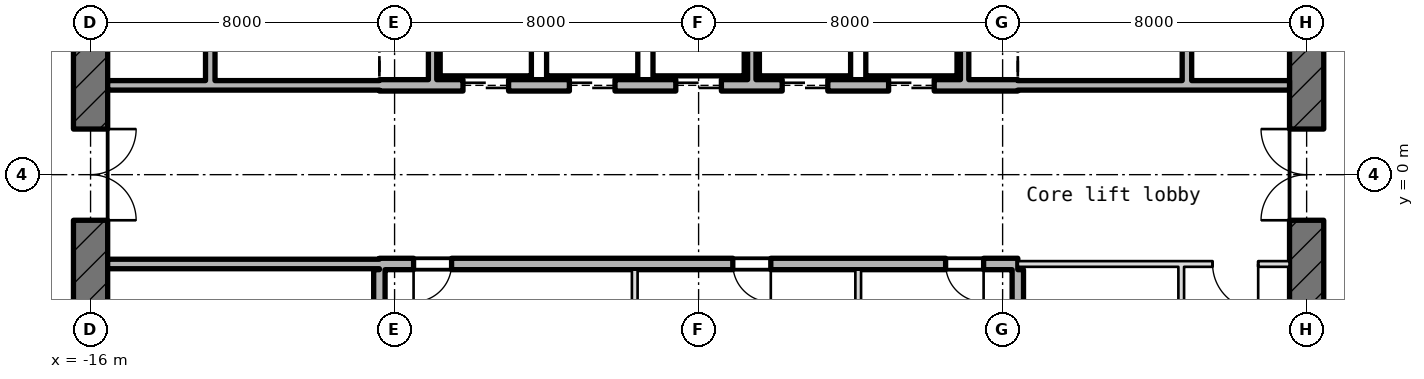
"""IFC4 building model, lengths in metres.
Left out: names, types, materials, properties, quantities, classifications, styles, units other than length and angle.
Written with IfcOpenShell. Run it as: python <this file> out.ifc"""

import sys

from ifc_helpers import new_model, si_unit, direction, frame, frame_2d, origin, place, context, subcontext, project, spatial, rectangle, extrude, element, fill, save


model = new_model("IFC4")
c1 = context("Model", 3, precision=1e-05, world=origin(), true_north=direction((0.0, 1.0)))
c2 = subcontext(c1, "Body", "Model", "MODEL_VIEW")
j1 = project(units=[si_unit("LENGTHUNIT", "METRE"), si_unit("PLANEANGLEUNIT", "RADIAN")], contexts=[c1])
p1 = place(None, origin())
s1 = spatial("IfcSite", under=j1, at=p1, CompositionType="ELEMENT")
p2 = place(p1, origin())
s2 = spatial("IfcBuilding", under=s1, at=p2, CompositionType="ELEMENT")
p3 = place(p2, frame((0.0, 0.0, 248.2)))
s3 = spatial("IfcBuildingStorey", under=s2, at=p3, CompositionType="ELEMENT", Elevation=248.2)
p4 = place(p3, frame((16.0, -10.186, -0.18), z_axis=(0.0, 0.0, 1.0), x_axis=(0.0, 1.0, 0.0)))
e1 = element("IfcWall", 1, at=p4, inside=s3, PredefinedType="SHEAR", context=c2, shape_type="SweptSolid", body=[
    extrude(rectangle(XDim=20.373, YDim=0.9, at=frame_2d((10.186, 0.0))), origin(), (0.0, 0.0, 1.0), 4.15),
])
p5 = place(p4, frame((8.986, 0.0, 0.18)))
e2 = element("IfcOpeningElement", 2, at=p5, cuts=e1, PredefinedType="OPENING", context=c2, shape_type="SweptSolid", body=[
    extrude(rectangle(XDim=2.4, YDim=2.1, at=frame_2d((1.2, 1.05))), frame((0.0, 0.46, 0.0), z_axis=(0.0, -1.0, 0.0), x_axis=(1.0, 0.0, 0.0)), (0.0, 0.0, 1.0), 0.92),
])
p6 = place(p4, frame((13.586, 0.0, 0.18)))
e3 = element("IfcOpeningElement", 3, at=p6, cuts=e1, PredefinedType="OPENING", context=c2, shape_type="SweptSolid", body=[
    extrude(rectangle(XDim=1.2, YDim=2.1, at=frame_2d((0.6, 1.05))), frame((0.0, 0.46, 0.0), z_axis=(0.0, -1.0, 0.0), x_axis=(1.0, 0.0, 0.0)), (0.0, 0.0, 1.0), 0.92),
])
p7 = place(p3, frame((-16.0, 10.186, -0.18), z_axis=(0.0, 0.0, 1.0), x_axis=(0.0, -1.0, 0.0)))
e4 = element("IfcWall", 4, at=p7, inside=s3, PredefinedType="SHEAR", context=c2, shape_type="SweptSolid", body=[
    extrude(rectangle(XDim=20.373, YDim=0.9, at=frame_2d((10.186, 0.0))), origin(), (0.0, 0.0, 1.0), 4.15),
])
p8 = place(p7, frame((8.986, 0.0, 0.18)))
e5 = element("IfcOpeningElement", 5, at=p8, cuts=e4, PredefinedType="OPENING", context=c2, shape_type="SweptSolid", body=[
    extrude(rectangle(XDim=2.4, YDim=2.1, at=frame_2d((1.2, 1.05))), frame((0.0, 0.46, 0.0), z_axis=(0.0, -1.0, 0.0), x_axis=(1.0, 0.0, 0.0)), (0.0, 0.0, 1.0), 0.92),
])
p9 = place(p7, frame((5.586, 0.0, 0.18)))
e6 = element("IfcOpeningElement", 6, at=p9, cuts=e4, PredefinedType="OPENING", context=c2, shape_type="SweptSolid", body=[
    extrude(rectangle(XDim=1.2, YDim=2.1, at=frame_2d((0.6, 1.05))), frame((0.0, 0.46, 0.0), z_axis=(0.0, -1.0, 0.0), x_axis=(1.0, 0.0, 0.0)), (0.0, 0.0, 1.0), 0.92),
])
p10 = place(p3, frame((-15.55, -2.35, 0.0), z_axis=(0.0, 0.0, 1.0), x_axis=(1.0, 0.0, 0.0)))
e7 = element("IfcWall", 7, at=p10, inside=s3, PredefinedType="STANDARD", context=c2, shape_type="SweptSolid", body=[
    extrude(rectangle(XDim=7.15, YDim=0.25, at=frame_2d((3.575, 0.0))), origin(), (0.0, 0.0, 1.0), 3.97),
])
p11 = place(p3, frame((-8.4, -2.35, -0.18), z_axis=(0.0, 0.0, 1.0), x_axis=(1.0, 0.0, 0.0)))
e8 = element("IfcWall", 8, at=p11, inside=s3, PredefinedType="SHEAR", context=c2, shape_type="SweptSolid", body=[
    extrude(rectangle(XDim=16.8, YDim=0.3, at=frame_2d((8.4, 0.0))), origin(), (0.0, 0.0, 1.0), 4.15),
])
p12 = place(p11, frame((0.9, 0.0, 0.18)))
e9 = element("IfcOpeningElement", 9, at=p12, cuts=e8, PredefinedType="OPENING", context=c2, shape_type="SweptSolid", body=[
    extrude(rectangle(XDim=1.0, YDim=2.1, at=frame_2d((0.5, 1.05))), frame((0.0, 0.16, 0.0), z_axis=(0.0, -1.0, 0.0), x_axis=(1.0, 0.0, 0.0)), (0.0, 0.0, 1.0), 0.32),
])
p13 = place(p11, frame((9.3, 0.0, 0.18)))
e10 = element("IfcOpeningElement", 10, at=p13, cuts=e8, PredefinedType="OPENING", context=c2, shape_type="SweptSolid", body=[
    extrude(rectangle(XDim=1.0, YDim=2.1, at=frame_2d((0.5, 1.05))), frame((0.0, 0.16, 0.0), z_axis=(0.0, -1.0, 0.0), x_axis=(1.0, 0.0, 0.0)), (0.0, 0.0, 1.0), 0.32),
])
p14 = place(p11, frame((14.9, 0.0, 0.18)))
e11 = element("IfcOpeningElement", 11, at=p14, cuts=e8, PredefinedType="OPENING", context=c2, shape_type="SweptSolid", body=[
    extrude(rectangle(XDim=1.0, YDim=2.1, at=frame_2d((0.5, 1.05))), frame((0.0, 0.16, 0.0), z_axis=(0.0, -1.0, 0.0), x_axis=(1.0, 0.0, 0.0)), (0.0, 0.0, 1.0), 0.32),
])
p15 = place(p3, frame((8.4, -2.35, 0.0), z_axis=(0.0, 0.0, 1.0), x_axis=(1.0, 0.0, 0.0)))
e12 = element("IfcWall", 12, at=p15, inside=s3, PredefinedType="PARTITIONING", context=c2, shape_type="SweptSolid", body=[
    extrude(rectangle(XDim=7.15, YDim=0.15, at=frame_2d((3.575, 0.0))), origin(), (0.0, 0.0, 1.0), 3.97),
])
p16 = place(p15, frame((5.125, 0.0, 0.0)))
e13 = element("IfcOpeningElement", 13, at=p16, cuts=e12, PredefinedType="OPENING", context=c2, shape_type="SweptSolid", body=[
    extrude(rectangle(XDim=1.2, YDim=2.1, at=frame_2d((0.6, 1.05))), frame((0.0, 0.085, 0.0), z_axis=(0.0, -1.0, 0.0), x_axis=(1.0, 0.0, 0.0)), (0.0, 0.0, 1.0), 0.17),
])
p17 = place(p3, frame((-15.55, 2.35, 0.0), z_axis=(0.0, 0.0, 1.0), x_axis=(1.0, 0.0, 0.0)))
e14 = element("IfcWall", 14, at=p17, inside=s3, PredefinedType="STANDARD", context=c2, shape_type="SweptSolid", body=[
    extrude(rectangle(XDim=7.15, YDim=0.25, at=frame_2d((3.575, 0.0))), origin(), (0.0, 0.0, 1.0), 3.97),
])
p18 = place(p3, frame((-8.4, 2.35, -0.18), z_axis=(0.0, 0.0, 1.0), x_axis=(1.0, 0.0, 0.0)))
e15 = element("IfcWall", 15, at=p18, inside=s3, PredefinedType="SHEAR", context=c2, shape_type="SweptSolid", body=[
    extrude(rectangle(XDim=16.8, YDim=0.3, at=frame_2d((8.4, 0.0))), origin(), (0.0, 0.0, 1.0), 4.15),
])
p19 = place(p18, frame((2.2, 0.0, 0.18)))
e16 = element("IfcOpeningElement", 16, at=p19, cuts=e15, PredefinedType="OPENING", context=c2, shape_type="SweptSolid", body=[
    extrude(rectangle(XDim=1.2, YDim=2.1, at=frame_2d((0.6, 1.05))), frame((0.0, 0.16, 0.0), z_axis=(0.0, -1.0, 0.0), x_axis=(1.0, 0.0, 0.0)), (0.0, 0.0, 1.0), 0.32),
])
p20 = place(p18, frame((5.0, 0.0, 0.18)))
e17 = element("IfcOpeningElement", 17, at=p20, cuts=e15, PredefinedType="OPENING", context=c2, shape_type="SweptSolid", body=[
    extrude(rectangle(XDim=1.2, YDim=2.1, at=frame_2d((0.6, 1.05))), frame((0.0, 0.16, 0.0), z_axis=(0.0, -1.0, 0.0), x_axis=(1.0, 0.0, 0.0)), (0.0, 0.0, 1.0), 0.32),
])
p21 = place(p18, frame((7.8, 0.0, 0.18)))
e18 = element("IfcOpeningElement", 18, at=p21, cuts=e15, PredefinedType="OPENING", context=c2, shape_type="SweptSolid", body=[
    extrude(rectangle(XDim=1.2, YDim=2.1, at=frame_2d((0.6, 1.05))), frame((0.0, 0.16, 0.0), z_axis=(0.0, -1.0, 0.0), x_axis=(1.0, 0.0, 0.0)), (0.0, 0.0, 1.0), 0.32),
])
p22 = place(p18, frame((10.6, 0.0, 0.18)))
e19 = element("IfcOpeningElement", 19, at=p22, cuts=e15, PredefinedType="OPENING", context=c2, shape_type="SweptSolid", body=[
    extrude(rectangle(XDim=1.2, YDim=2.1, at=frame_2d((0.6, 1.05))), frame((0.0, 0.16, 0.0), z_axis=(0.0, -1.0, 0.0), x_axis=(1.0, 0.0, 0.0)), (0.0, 0.0, 1.0), 0.32),
])
p23 = place(p18, frame((13.4, 0.0, 0.18)))
e20 = element("IfcOpeningElement", 20, at=p23, cuts=e15, PredefinedType="OPENING", context=c2, shape_type="SweptSolid", body=[
    extrude(rectangle(XDim=1.2, YDim=2.1, at=frame_2d((0.6, 1.05))), frame((0.0, 0.16, 0.0), z_axis=(0.0, -1.0, 0.0), x_axis=(1.0, 0.0, 0.0)), (0.0, 0.0, 1.0), 0.32),
])
p24 = place(p3, frame((8.4, 2.35, 0.0), z_axis=(0.0, 0.0, 1.0), x_axis=(1.0, 0.0, 0.0)))
e21 = element("IfcWall", 21, at=p24, inside=s3, PredefinedType="STANDARD", context=c2, shape_type="SweptSolid", body=[
    extrude(rectangle(XDim=7.15, YDim=0.25, at=frame_2d((3.575, 0.0))), origin(), (0.0, 0.0, 1.0), 3.97),
])
p25 = place(p3, frame((-12.85, 2.475, 0.0), z_axis=(0.0, 0.0, 1.0), x_axis=(0.0, 1.0, 0.0)))
e22 = element("IfcWall", 22, at=p25, inside=s3, PredefinedType="STANDARD", context=c2, shape_type="SweptSolid", body=[
    extrude(rectangle(XDim=3.05, YDim=0.25, at=frame_2d((1.525, 0.0))), origin(), (0.0, 0.0, 1.0), 3.97),
])
p26 = place(p3, frame((-8.4, -8.75, -0.18), z_axis=(0.0, 0.0, 1.0), x_axis=(0.0, 1.0, 0.0)))
e23 = element("IfcWall", 23, at=p26, inside=s3, PredefinedType="SHEAR", context=c2, shape_type="SweptSolid", body=[
    extrude(rectangle(XDim=6.25, YDim=0.3, at=frame_2d((3.125, 0.0))), origin(), (0.0, 0.0, 1.0), 4.15),
])
p27 = place(p3, frame((-7.0, 2.5, 0.0), z_axis=(0.0, 0.0, 1.0), x_axis=(0.0, 1.0, 0.0)))
e24 = element("IfcWall", 24, at=p27, inside=s3, PredefinedType="STANDARD", context=c2, shape_type="SweptSolid", body=[
    extrude(rectangle(XDim=2.74, YDim=0.22, at=frame_2d((1.37, 0.0))), origin(), (0.0, 0.0, 1.0), 3.97),
])
p28 = place(p3, frame((-1.68, -5.24, 0.0), z_axis=(0.0, 0.0, 1.0), x_axis=(0.0, 1.0, 0.0)))
e25 = element("IfcWall", 25, at=p28, inside=s3, PredefinedType="PARTITIONING", context=c2, shape_type="SweptSolid", body=[
    extrude(rectangle(XDim=2.74, YDim=0.15, at=frame_2d((1.37, 0.0))), origin(), (0.0, 0.0, 1.0), 3.97),
])
p29 = place(p3, frame((1.4, 2.5, 0.0), z_axis=(0.0, 0.0, 1.0), x_axis=(0.0, 1.0, 0.0)))
e26 = element("IfcWall", 26, at=p29, inside=s3, PredefinedType="STANDARD", context=c2, shape_type="SweptSolid", body=[
    extrude(rectangle(XDim=2.74, YDim=0.22, at=frame_2d((1.37, 0.0))), origin(), (0.0, 0.0, 1.0), 3.97),
])
p30 = place(p3, frame((4.2, -5.24, 0.0), z_axis=(0.0, 0.0, 1.0), x_axis=(0.0, 1.0, 0.0)))
e27 = element("IfcWall", 27, at=p30, inside=s3, PredefinedType="PARTITIONING", context=c2, shape_type="SweptSolid", body=[
    extrude(rectangle(XDim=2.74, YDim=0.15, at=frame_2d((1.37, 0.0))), origin(), (0.0, 0.0, 1.0), 3.97),
])
p31 = place(p3, frame((7.0, 2.5, 0.0), z_axis=(0.0, 0.0, 1.0), x_axis=(0.0, 1.0, 0.0)))
e28 = element("IfcWall", 28, at=p31, inside=s3, PredefinedType="STANDARD", context=c2, shape_type="SweptSolid", body=[
    extrude(rectangle(XDim=2.74, YDim=0.22, at=frame_2d((1.37, 0.0))), origin(), (0.0, 0.0, 1.0), 3.97),
])
p32 = place(p3, frame((8.4, -8.35, -0.18), z_axis=(0.0, 0.0, 1.0), x_axis=(0.0, 1.0, 0.0)))
e29 = element("IfcWall", 29, at=p32, inside=s3, PredefinedType="SHEAR", context=c2, shape_type="SweptSolid", body=[
    extrude(rectangle(XDim=5.85, YDim=0.3, at=frame_2d((2.925, 0.0))), origin(), (0.0, 0.0, 1.0), 4.15),
])
p33 = place(p3, frame((12.7, -12.55, 0.0), z_axis=(0.0, 0.0, 1.0), x_axis=(0.0, 1.0, 0.0)))
e30 = element("IfcWall", 30, at=p33, inside=s3, PredefinedType="PARTITIONING", context=c2, shape_type="SweptSolid", body=[
    extrude(rectangle(XDim=10.125, YDim=0.15, at=frame_2d((5.062, 0.0))), origin(), (0.0, 0.0, 1.0), 3.97),
])
p34 = place(p33, frame((7.875, 0.0, 0.0)))
e31 = element("IfcOpeningElement", 31, at=p34, cuts=e30, PredefinedType="OPENING", context=c2, shape_type="SweptSolid", body=[
    extrude(rectangle(XDim=1.0, YDim=2.1, at=frame_2d((0.5, 1.05))), frame((0.0, 0.085, 0.0), z_axis=(0.0, -1.0, 0.0), x_axis=(1.0, 0.0, 0.0)), (0.0, 0.0, 1.0), 0.17),
])
p35 = place(p33, frame((2.775, 0.0, 0.0)))
e32 = element("IfcOpeningElement", 32, at=p35, cuts=e30, PredefinedType="OPENING", context=c2, shape_type="SweptSolid", body=[
    extrude(rectangle(XDim=1.0, YDim=2.1, at=frame_2d((0.5, 1.05))), frame((0.0, 0.085, 0.0), z_axis=(0.0, -1.0, 0.0), x_axis=(1.0, 0.0, 0.0)), (0.0, 0.0, 1.0), 0.17),
])
p36 = place(p3, frame((12.85, 2.475, 0.0), z_axis=(0.0, 0.0, 1.0), x_axis=(0.0, 1.0, 0.0)))
e33 = element("IfcWall", 33, at=p36, inside=s3, PredefinedType="STANDARD", context=c2, shape_type="SweptSolid", body=[
    extrude(rectangle(XDim=3.05, YDim=0.25, at=frame_2d((1.525, 0.0))), origin(), (0.0, 0.0, 1.0), 3.97),
])
p37 = place(p19, origin())
e34 = element("IfcDoor", 34, at=p37, inside=s3, OperationType="DOUBLE_DOOR_SLIDING", PredefinedType="DOOR", context=c2, shape_type="SweptSolid", body=[
    extrude(rectangle(XDim=1.2, YDim=2.1, at=frame_2d((0.6, 1.05))), frame((0.0, 0.025, 0.0), z_axis=(0.0, -1.0, 0.0), x_axis=(1.0, 0.0, 0.0)), (0.0, 0.0, 1.0), 0.05),
])
fill(e16, e34)
p38 = place(p20, origin())
e35 = element("IfcDoor", 35, at=p38, inside=s3, OperationType="DOUBLE_DOOR_SLIDING", PredefinedType="DOOR", context=c2, shape_type="SweptSolid", body=[
    extrude(rectangle(XDim=1.2, YDim=2.1, at=frame_2d((0.6, 1.05))), frame((0.0, 0.025, 0.0), z_axis=(0.0, -1.0, 0.0), x_axis=(1.0, 0.0, 0.0)), (0.0, 0.0, 1.0), 0.05),
])
fill(e17, e35)
p39 = place(p21, origin())
e36 = element("IfcDoor", 36, at=p39, inside=s3, OperationType="DOUBLE_DOOR_SLIDING", PredefinedType="DOOR", context=c2, shape_type="SweptSolid", body=[
    extrude(rectangle(XDim=1.2, YDim=2.1, at=frame_2d((0.6, 1.05))), frame((0.0, 0.025, 0.0), z_axis=(0.0, -1.0, 0.0), x_axis=(1.0, 0.0, 0.0)), (0.0, 0.0, 1.0), 0.05),
])
fill(e18, e36)
p40 = place(p22, origin())
e37 = element("IfcDoor", 37, at=p40, inside=s3, OperationType="DOUBLE_DOOR_SLIDING", PredefinedType="DOOR", context=c2, shape_type="SweptSolid", body=[
    extrude(rectangle(XDim=1.2, YDim=2.1, at=frame_2d((0.6, 1.05))), frame((0.0, 0.025, 0.0), z_axis=(0.0, -1.0, 0.0), x_axis=(1.0, 0.0, 0.0)), (0.0, 0.0, 1.0), 0.05),
])
fill(e19, e37)
p41 = place(p23, origin())
e38 = element("IfcDoor", 38, at=p41, inside=s3, OperationType="DOUBLE_DOOR_SLIDING", PredefinedType="DOOR", context=c2, shape_type="SweptSolid", body=[
    extrude(rectangle(XDim=1.2, YDim=2.1, at=frame_2d((0.6, 1.05))), frame((0.0, 0.025, 0.0), z_axis=(0.0, -1.0, 0.0), x_axis=(1.0, 0.0, 0.0)), (0.0, 0.0, 1.0), 0.05),
])
fill(e20, e38)
p42 = place(p8, origin())
e39 = element("IfcDoor", 39, at=p42, inside=s3, OperationType="DOUBLE_DOOR_SINGLE_SWING", PredefinedType="DOOR", context=c2, shape_type="SweptSolid", body=[
    extrude(rectangle(XDim=2.4, YDim=2.1, at=frame_2d((1.2, 1.05))), frame((0.0, 0.025, 0.0), z_axis=(0.0, -1.0, 0.0), x_axis=(1.0, 0.0, 0.0)), (0.0, 0.0, 1.0), 0.05),
])
fill(e5, e39)
p43 = place(p5, origin())
e40 = element("IfcDoor", 40, at=p43, inside=s3, OperationType="DOUBLE_DOOR_SINGLE_SWING", PredefinedType="DOOR", context=c2, shape_type="SweptSolid", body=[
    extrude(rectangle(XDim=2.4, YDim=2.1, at=frame_2d((1.2, 1.05))), frame((0.0, 0.025, 0.0), z_axis=(0.0, -1.0, 0.0), x_axis=(1.0, 0.0, 0.0)), (0.0, 0.0, 1.0), 0.05),
])
fill(e2, e40)
p44 = place(p12, frame((1.0, 0.0, 0.0), z_axis=(0.0, 0.0, 1.0), x_axis=(-1.0, 0.0, 0.0)))
e41 = element("IfcDoor", 41, at=p44, inside=s3, OperationType="SINGLE_SWING_LEFT", PredefinedType="DOOR", context=c2, shape_type="SweptSolid", body=[
    extrude(rectangle(XDim=1.0, YDim=2.1, at=frame_2d((0.5, 1.05))), frame((0.0, 0.025, 0.0), z_axis=(0.0, -1.0, 0.0), x_axis=(1.0, 0.0, 0.0)), (0.0, 0.0, 1.0), 0.05),
])
fill(e9, e41)
p45 = place(p13, frame((1.0, 0.0, 0.0), z_axis=(0.0, 0.0, 1.0), x_axis=(-1.0, 0.0, 0.0)))
e42 = element("IfcDoor", 42, at=p45, inside=s3, OperationType="SINGLE_SWING_LEFT", PredefinedType="DOOR", context=c2, shape_type="SweptSolid", body=[
    extrude(rectangle(XDim=1.0, YDim=2.1, at=frame_2d((0.5, 1.05))), frame((0.0, 0.025, 0.0), z_axis=(0.0, -1.0, 0.0), x_axis=(1.0, 0.0, 0.0)), (0.0, 0.0, 1.0), 0.05),
])
fill(e10, e42)
p46 = place(p14, frame((1.0, 0.0, 0.0), z_axis=(0.0, 0.0, 1.0), x_axis=(-1.0, 0.0, 0.0)))
e43 = element("IfcDoor", 43, at=p46, inside=s3, OperationType="SINGLE_SWING_LEFT", PredefinedType="DOOR", context=c2, shape_type="SweptSolid", body=[
    extrude(rectangle(XDim=1.0, YDim=2.1, at=frame_2d((0.5, 1.05))), frame((0.0, 0.025, 0.0), z_axis=(0.0, -1.0, 0.0), x_axis=(1.0, 0.0, 0.0)), (0.0, 0.0, 1.0), 0.05),
])
fill(e11, e43)
p47 = place(p16, frame((1.2, 0.0, 0.0), z_axis=(0.0, 0.0, 1.0), x_axis=(-1.0, 0.0, 0.0)))
e44 = element("IfcDoor", 44, at=p47, inside=s3, OperationType="SINGLE_SWING_LEFT", PredefinedType="DOOR", context=c2, shape_type="SweptSolid", body=[
    extrude(rectangle(XDim=1.2, YDim=2.1, at=frame_2d((0.6, 1.05))), frame((0.0, 0.025, 0.0), z_axis=(0.0, -1.0, 0.0), x_axis=(1.0, 0.0, 0.0)), (0.0, 0.0, 1.0), 0.05),
])
fill(e13, e44)
save(model, sys.argv[1])
